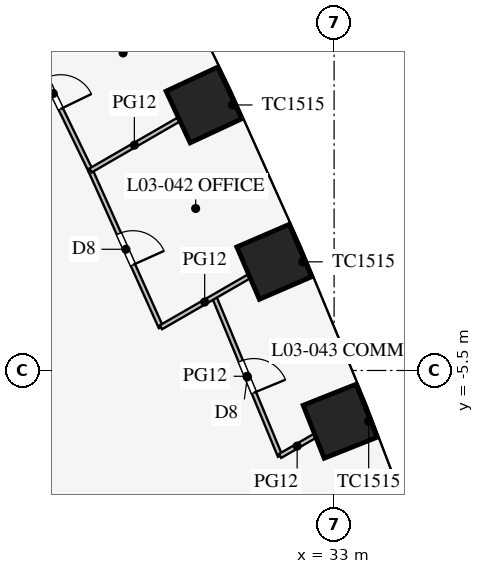
"""IFC4 building model, lengths in metres.
Left out: names, types, materials, properties, quantities, classifications, styles, units other than length and angle.
Written with IfcOpenShell. Run it as: python <this file> out.ifc"""

import sys

from ifc_helpers import new_model, si_unit, direction, frame, frame_2d, origin, origin_2d, place, context, subcontext, project, spatial, rectangle, extrude, element, fill, save


model = new_model("IFC4")
c1 = context("Model", 3, precision=1e-05, world=origin(), true_north=direction((0.0, 1.0)))
c2 = subcontext(c1, "Body", "Model", "MODEL_VIEW")
j1 = project(units=[si_unit("LENGTHUNIT", "METRE"), si_unit("PLANEANGLEUNIT", "RADIAN")], contexts=[c1])
p1 = place(None, origin())
s1 = spatial("IfcSite", under=j1, at=p1, CompositionType="ELEMENT")
p2 = place(p1, origin())
s2 = spatial("IfcBuilding", under=s1, at=p2, CompositionType="ELEMENT")
p3 = place(p2, frame((0.0, 0.0, 16.5)))
s3 = spatial("IfcBuildingStorey", under=s2, at=p3, CompositionType="ELEMENT", Elevation=16.5)
for number, where, z_axis, x_axis in (
    (1, (33.16, -6.836, 0.0), (0.0, 0.0, 1.0), (-0.369, 0.929, 0.0)),
    (2, (31.426, -2.641, 0.0), (0.0, 0.0, 1.0), (-0.396, 0.918, 0.0)),
    (3, (29.576, 1.487, 0.0), (0.0, 0.0, 1.0), (-0.423, 0.906, 0.0)),
):
    element("IfcColumn", number, at=place(p3, frame(where, z_axis=z_axis, x_axis=x_axis)), inside=s3, PredefinedType="COLUMN", context=c2, shape_type="SweptSolid", body=[
        extrude(rectangle(XDim=1.5, YDim=1.5, at=origin_2d()), origin(), (0.0, 0.0, 1.0), 4.2),
    ])
p4 = place(p3, frame((14.203, -8.2, 0.0), z_axis=(0.0, 0.0, 1.0), x_axis=(0.866024965723, -0.500000758745, 0.0)))
e4 = element("IfcWall", 4, at=p4, inside=s3, PredefinedType="PARTITIONING", context=c2, shape_type="SweptSolid", body=[
    extrude(rectangle(XDim=18.25, YDim=0.15, at=frame_2d((9.125, 0.0))), origin(), (0.0, 0.0, 1.0), 2.3),
])
p5 = place(p3, frame((26.591, -0.236, 0.0), z_axis=(0.0, 0.0, 1.0), x_axis=(-0.435857917556, 0.900015486369, 0.0)))
e5 = element("IfcWall", 5, at=p5, inside=s3, PredefinedType="PARTITIONING", context=c2, shape_type="SweptSolid", body=[
    extrude(rectangle(XDim=4.512, YDim=0.12, at=frame_2d((2.256, 0.0))), origin(), (0.0, 0.0, 1.0), 2.9),
])
p6 = place(p5, frame((1.8, 0.0, 0.15)))
e6 = element("IfcOpeningElement", 6, at=p6, cuts=e5, PredefinedType="OPENING", context=c2, shape_type="SweptSolid", body=[
    extrude(rectangle(XDim=0.9, YDim=2.1, at=frame_2d((0.45, 1.05))), frame((0.0, 0.07, 0.0), z_axis=(0.0, -1.0, 0.0), x_axis=(1.0, 0.0, 0.0)), (0.0, 0.0, 1.0), 0.14),
])
p7 = place(p3, frame((28.443, -4.363, 0.0), z_axis=(0.0, 0.0, 1.0), x_axis=(-0.409495979977, 0.912311921649, 0.0)))
e7 = element("IfcWall", 7, at=p7, inside=s3, PredefinedType="PARTITIONING", context=c2, shape_type="SweptSolid", body=[
    extrude(rectangle(XDim=4.523, YDim=0.12, at=frame_2d((2.262, 0.0))), origin(), (0.0, 0.0, 1.0), 2.9),
])
p8 = place(p7, frame((1.8, 0.0, 0.15)))
e8 = element("IfcOpeningElement", 8, at=p8, cuts=e7, PredefinedType="OPENING", context=c2, shape_type="SweptSolid", body=[
    extrude(rectangle(XDim=0.9, YDim=2.1, at=frame_2d((0.45, 1.05))), frame((0.0, 0.07, 0.0), z_axis=(0.0, -1.0, 0.0), x_axis=(1.0, 0.0, 0.0)), (0.0, 0.0, 1.0), 0.14),
])
p9 = place(p3, frame((31.578, -7.749, 0.0), z_axis=(0.0, 0.0, 1.0), x_axis=(-0.38265900014, 0.923889652292, 0.0)))
e9 = element("IfcWall", 9, at=p9, inside=s3, PredefinedType="PARTITIONING", context=c2, shape_type="SweptSolid", body=[
    extrude(rectangle(XDim=4.539, YDim=0.12, at=frame_2d((2.27, 0.0))), origin(), (0.0, 0.0, 1.0), 2.9),
])
p10 = place(p9, frame((1.8, 0.0, 0.15)))
e10 = element("IfcOpeningElement", 10, at=p10, cuts=e9, PredefinedType="OPENING", context=c2, shape_type="SweptSolid", body=[
    extrude(rectangle(XDim=0.9, YDim=2.1, at=frame_2d((0.45, 1.05))), frame((0.0, 0.07, 0.0), z_axis=(0.0, -1.0, 0.0), x_axis=(1.0, 0.0, 0.0)), (0.0, 0.0, 1.0), 0.14),
])
p11 = place(p3, frame((26.591, -0.236, 0.0), z_axis=(0.0, 0.0, 1.0), x_axis=(0.866023818221, 0.500002746266, 0.0)))
e11 = element("IfcWall", 11, at=p11, inside=s3, PredefinedType="PARTITIONING", context=c2, shape_type="SweptSolid", body=[
    extrude(rectangle(XDim=2.664, YDim=0.12, at=frame_2d((1.332, 0.0))), origin(), (0.0, 0.0, 1.0), 2.9),
])
p12 = place(p3, frame((28.443, -4.363, 0.0), z_axis=(0.0, 0.0, 1.0), x_axis=(0.866031171652, 0.499990009627, 0.0)))
e12 = element("IfcWall", 12, at=p12, inside=s3, PredefinedType="PARTITIONING", context=c2, shape_type="SweptSolid", body=[
    extrude(rectangle(XDim=2.659, YDim=0.12, at=frame_2d((1.33, 0.0))), origin(), (0.0, 0.0, 1.0), 2.9),
])
p13 = place(p3, frame((31.578, -7.749, 0.0), z_axis=(0.0, 0.0, 1.0), x_axis=(0.866064200236, 0.499932796552, 0.0)))
e13 = element("IfcWall", 13, at=p13, inside=s3, PredefinedType="PARTITIONING", context=c2, shape_type="SweptSolid", body=[
    extrude(rectangle(XDim=1.038, YDim=0.12, at=frame_2d((0.519, 0.0))), origin(), (0.0, 0.0, 1.0), 2.9),
])
p14 = place(p6, frame((0.9, 0.0, 0.0), z_axis=(0.0, 0.0, 1.0), x_axis=(-1.0, 0.0, 0.0)))
e14 = element("IfcDoor", 14, at=p14, inside=s3, OperationType="SINGLE_SWING_RIGHT", PredefinedType="DOOR", context=c2, shape_type="SweptSolid", body=[
    extrude(rectangle(XDim=0.9, YDim=2.1, at=frame_2d((0.45, 1.05))), frame((0.0, 0.025, 0.0), z_axis=(0.0, -1.0, 0.0), x_axis=(1.0, 0.0, 0.0)), (0.0, 0.0, 1.0), 0.05),
])
fill(e6, e14)
p15 = place(p8, frame((0.9, 0.0, 0.0), z_axis=(0.0, 0.0, 1.0), x_axis=(-1.0, 0.0, 0.0)))
e15 = element("IfcDoor", 15, at=p15, inside=s3, OperationType="SINGLE_SWING_RIGHT", PredefinedType="DOOR", context=c2, shape_type="SweptSolid", body=[
    extrude(rectangle(XDim=0.9, YDim=2.1, at=frame_2d((0.45, 1.05))), frame((0.0, 0.025, 0.0), z_axis=(0.0, -1.0, 0.0), x_axis=(1.0, 0.0, 0.0)), (0.0, 0.0, 1.0), 0.05),
])
fill(e8, e15)
p16 = place(p10, frame((0.9, 0.0, 0.0), z_axis=(0.0, 0.0, 1.0), x_axis=(-1.0, 0.0, 0.0)))
e16 = element("IfcDoor", 16, at=p16, inside=s3, OperationType="SINGLE_SWING_RIGHT", PredefinedType="DOOR", context=c2, shape_type="SweptSolid", body=[
    extrude(rectangle(XDim=0.9, YDim=2.1, at=frame_2d((0.45, 1.05))), frame((0.0, 0.025, 0.0), z_axis=(0.0, -1.0, 0.0), x_axis=(1.0, 0.0, 0.0)), (0.0, 0.0, 1.0), 0.05),
])
fill(e10, e16)
save(model, sys.argv[1])
